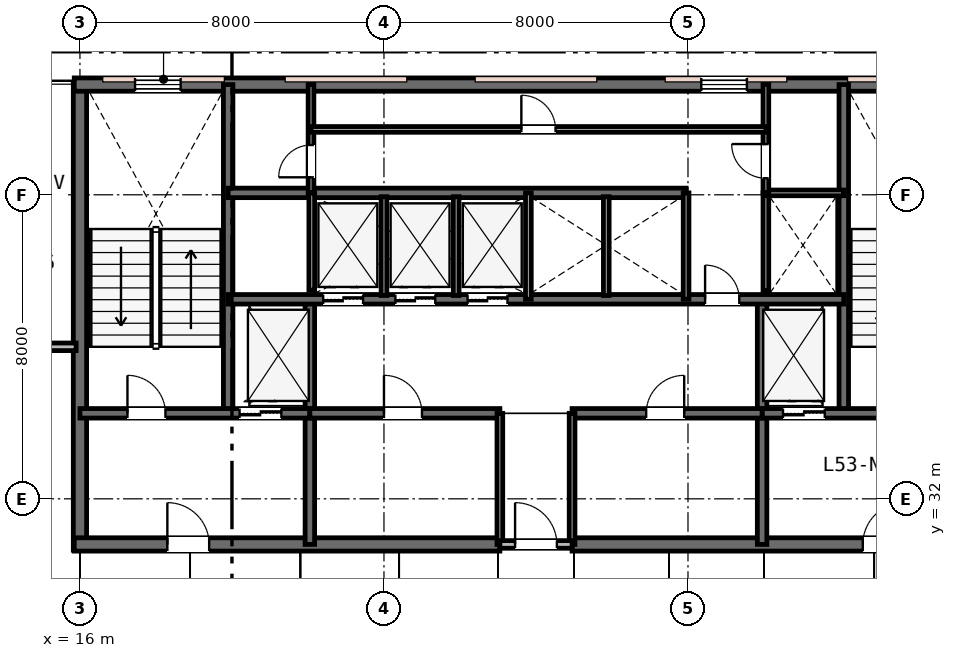
"""IFC4 building model, lengths in metres.
Left out: names, types, materials, properties, quantities, classifications, styles, units other than length and angle.
Written with IfcOpenShell. Run it as: python <this file> out.ifc"""

import sys

from ifc_helpers import new_model, si_unit, direction, frame, frame_2d, origin, place, context, subcontext, project, spatial, rectangle, extrude, element, fill, save


model = new_model("IFC4")
c1 = context("Model", 3, precision=1e-05, world=origin(), true_north=direction((0.0, 1.0)))
c2 = subcontext(c1, "Body", "Model", "MODEL_VIEW")
j1 = project(units=[si_unit("LENGTHUNIT", "METRE"), si_unit("PLANEANGLEUNIT", "RADIAN")], contexts=[c1])
p1 = place(None, origin())
s1 = spatial("IfcSite", under=j1, at=p1, CompositionType="ELEMENT")
p2 = place(p1, origin())
s2 = spatial("IfcBuilding", under=s1, at=p2, CompositionType="ELEMENT")
p3 = place(p2, frame((0.0, 0.0, 204.6)))
s3 = spatial("IfcBuildingStorey", under=s2, at=p3, CompositionType="ELEMENT", Elevation=204.6)
p4 = place(p3, frame((16.0, 30.65, 0.0), z_axis=(0.0, 0.0, 1.0), x_axis=(0.0, 1.0, 0.0)))
e1 = element("IfcWall", 1, at=p4, inside=s3, PredefinedType="SHEAR", context=c2, shape_type="SweptSolid", body=[
    extrude(rectangle(XDim=12.3, YDim=0.35, at=frame_2d((6.15, 0.0))), origin(), (0.0, 0.0, 1.0), 3.6),
])
p5 = place(p3, frame((15.85, 42.9, 0.0), z_axis=(0.0, 0.0, 1.0), x_axis=(1.0, 0.0, 0.0)))
e2 = element("IfcWall", 2, at=p5, inside=s3, PredefinedType="SHEAR", context=c2, shape_type="SweptSolid", body=[
    extrude(rectangle(XDim=24.3, YDim=0.35, at=frame_2d((12.15, 0.0))), origin(), (0.0, 0.0, 1.0), 3.6),
])
p6 = place(p5, frame((1.6, 0.0, 0.95)))
e3 = element("IfcOpeningElement", 3, at=p6, cuts=e2, PredefinedType="OPENING", context=c2, shape_type="SweptSolid", body=[
    extrude(rectangle(XDim=1.2, YDim=1.6, at=frame_2d((0.6, 0.8))), frame((0.0, 0.185, 0.0), z_axis=(0.0, -1.0, 0.0), x_axis=(1.0, 0.0, 0.0)), (0.0, 0.0, 1.0), 0.37),
])
p7 = place(p5, frame((16.5, 0.0, 0.95)))
e4 = element("IfcOpeningElement", 4, at=p7, cuts=e2, PredefinedType="OPENING", context=c2, shape_type="SweptSolid", body=[
    extrude(rectangle(XDim=1.2, YDim=1.6, at=frame_2d((0.6, 0.8))), frame((0.0, 0.185, 0.0), z_axis=(0.0, -1.0, 0.0), x_axis=(1.0, 0.0, 0.0)), (0.0, 0.0, 1.0), 0.37),
])
p8 = place(p5, frame((21.6, 0.0, 0.95)))
e5 = element("IfcOpeningElement", 5, at=p8, cuts=e2, PredefinedType="OPENING", context=c2, shape_type="SweptSolid", body=[
    extrude(rectangle(XDim=1.2, YDim=1.6, at=frame_2d((0.6, 0.8))), frame((0.0, 0.185, 0.0), z_axis=(0.0, -1.0, 0.0), x_axis=(1.0, 0.0, 0.0)), (0.0, 0.0, 1.0), 0.37),
])
p9 = place(p3, frame((15.85, 30.8, 0.0), z_axis=(0.0, 0.0, 1.0), x_axis=(1.0, 0.0, 0.0)))
e6 = element("IfcWall", 6, at=p9, inside=s3, PredefinedType="SHEAR", context=c2, shape_type="SweptSolid", body=[
    extrude(rectangle(XDim=11.2, YDim=0.35, at=frame_2d((5.6, 0.0))), origin(), (0.0, 0.0, 1.0), 3.6),
])
p10 = place(p9, frame((2.45, 0.0, 0.0)))
e7 = element("IfcOpeningElement", 7, at=p10, cuts=e6, PredefinedType="OPENING", context=c2, shape_type="SweptSolid", body=[
    extrude(rectangle(XDim=1.1, YDim=2.15, at=frame_2d((0.55, 1.075))), frame((0.0, 0.185, 0.0), z_axis=(0.0, -1.0, 0.0), x_axis=(1.0, 0.0, 0.0)), (0.0, 0.0, 1.0), 0.37),
])
p11 = place(p3, frame((28.95, 30.8, 0.0), z_axis=(0.0, 0.0, 1.0), x_axis=(1.0, 0.0, 0.0)))
e8 = element("IfcWall", 8, at=p11, inside=s3, PredefinedType="SHEAR", context=c2, shape_type="SweptSolid", body=[
    extrude(rectangle(XDim=11.2, YDim=0.35, at=frame_2d((5.6, 0.0))), origin(), (0.0, 0.0, 1.0), 3.6),
])
p12 = place(p11, frame((7.65, 0.0, 0.0)))
e9 = element("IfcOpeningElement", 9, at=p12, cuts=e8, PredefinedType="OPENING", context=c2, shape_type="SweptSolid", body=[
    extrude(rectangle(XDim=1.1, YDim=2.15, at=frame_2d((0.55, 1.075))), frame((0.0, 0.185, 0.0), z_axis=(0.0, -1.0, 0.0), x_axis=(1.0, 0.0, 0.0)), (0.0, 0.0, 1.0), 0.37),
])
for number, where, z_axis, x_axis in (
    (10, (19.9, 34.25, 0.0), (0.0, 0.0, 1.0), (0.0, 1.0, 0.0)),
    (11, (36.1, 34.25, 0.0), (0.0, 0.0, 1.0), (0.0, 1.0, 0.0)),
):
    element("IfcWall", number, at=place(p3, frame(where, z_axis=z_axis, x_axis=x_axis)), inside=s3, PredefinedType="SHEAR", context=c2, shape_type="SweptSolid", body=[
        extrude(rectangle(XDim=8.65, YDim=0.25, at=frame_2d((4.325, 0.0))), origin(), (0.0, 0.0, 1.0), 3.6),
    ])
for number, where, z_axis, x_axis in (
    (12, (22.05, 30.8, 0.0), (0.0, 0.0, 1.0), (0.0, 1.0, 0.0)),
    (13, (33.95, 30.8, 0.0), (0.0, 0.0, 1.0), (0.0, 1.0, 0.0)),
):
    element("IfcWall", number, at=place(p3, frame(where, z_axis=z_axis, x_axis=x_axis)), inside=s3, PredefinedType="SHEAR", context=c2, shape_type="SweptSolid", body=[
        extrude(rectangle(XDim=6.45, YDim=0.25, at=frame_2d((3.225, 0.0))), origin(), (0.0, 0.0, 1.0), 3.6),
    ])
p13 = place(p3, frame((16.0, 34.25, 0.0), z_axis=(0.0, 0.0, 1.0), x_axis=(1.0, 0.0, 0.0)))
e14 = element("IfcWall", 14, at=p13, inside=s3, PredefinedType="SHEAR", context=c2, shape_type="SweptSolid", body=[
    extrude(rectangle(XDim=6.05, YDim=0.25, at=frame_2d((3.025, 0.0))), origin(), (0.0, 0.0, 1.0), 3.6),
])
p14 = place(p13, frame((1.25, 0.0, 0.0)))
e15 = element("IfcOpeningElement", 15, at=p14, cuts=e14, PredefinedType="OPENING", context=c2, shape_type="SweptSolid", body=[
    extrude(rectangle(XDim=1.0, YDim=2.15, at=frame_2d((0.5, 1.075))), frame((0.0, 0.135, 0.0), z_axis=(0.0, -1.0, 0.0), x_axis=(1.0, 0.0, 0.0)), (0.0, 0.0, 1.0), 0.27),
])
p15 = place(p13, frame((4.2, 0.0, 0.0)))
e16 = element("IfcOpeningElement", 16, at=p15, cuts=e14, PredefinedType="OPENING", context=c2, shape_type="SweptSolid", body=[
    extrude(rectangle(XDim=1.1, YDim=2.15, at=frame_2d((0.55, 1.075))), frame((0.0, 0.135, 0.0), z_axis=(0.0, -1.0, 0.0), x_axis=(1.0, 0.0, 0.0)), (0.0, 0.0, 1.0), 0.27),
])
p16 = place(p3, frame((33.95, 34.25, 0.0), z_axis=(0.0, 0.0, 1.0), x_axis=(1.0, 0.0, 0.0)))
e17 = element("IfcWall", 17, at=p16, inside=s3, PredefinedType="SHEAR", context=c2, shape_type="SweptSolid", body=[
    extrude(rectangle(XDim=6.05, YDim=0.25, at=frame_2d((3.025, 0.0))), origin(), (0.0, 0.0, 1.0), 3.6),
])
p17 = place(p16, frame((3.7, 0.0, 0.0)))
e18 = element("IfcOpeningElement", 18, at=p17, cuts=e17, PredefinedType="OPENING", context=c2, shape_type="SweptSolid", body=[
    extrude(rectangle(XDim=1.0, YDim=2.15, at=frame_2d((0.5, 1.075))), frame((0.0, 0.135, 0.0), z_axis=(0.0, -1.0, 0.0), x_axis=(1.0, 0.0, 0.0)), (0.0, 0.0, 1.0), 0.27),
])
p18 = place(p16, frame((0.55, 0.0, 0.0)))
e19 = element("IfcOpeningElement", 19, at=p18, cuts=e17, PredefinedType="OPENING", context=c2, shape_type="SweptSolid", body=[
    extrude(rectangle(XDim=1.1, YDim=2.15, at=frame_2d((0.55, 1.075))), frame((0.0, 0.135, 0.0), z_axis=(0.0, -1.0, 0.0), x_axis=(1.0, 0.0, 0.0)), (0.0, 0.0, 1.0), 0.27),
])
p19 = place(p3, frame((22.05, 34.25, 0.0), z_axis=(0.0, 0.0, 1.0), x_axis=(1.0, 0.0, 0.0)))
e20 = element("IfcWall", 20, at=p19, inside=s3, PredefinedType="SHEAR", context=c2, shape_type="SweptSolid", body=[
    extrude(rectangle(XDim=5.0, YDim=0.25, at=frame_2d((2.5, 0.0))), origin(), (0.0, 0.0, 1.0), 3.6),
])
p20 = place(p19, frame((1.95, 0.0, 0.0)))
e21 = element("IfcOpeningElement", 21, at=p20, cuts=e20, PredefinedType="OPENING", context=c2, shape_type="SweptSolid", body=[
    extrude(rectangle(XDim=1.0, YDim=2.15, at=frame_2d((0.5, 1.075))), frame((0.0, 0.135, 0.0), z_axis=(0.0, -1.0, 0.0), x_axis=(1.0, 0.0, 0.0)), (0.0, 0.0, 1.0), 0.27),
])
p21 = place(p3, frame((28.95, 34.25, 0.0), z_axis=(0.0, 0.0, 1.0), x_axis=(1.0, 0.0, 0.0)))
e22 = element("IfcWall", 22, at=p21, inside=s3, PredefinedType="SHEAR", context=c2, shape_type="SweptSolid", body=[
    extrude(rectangle(XDim=5.0, YDim=0.25, at=frame_2d((2.5, 0.0))), origin(), (0.0, 0.0, 1.0), 3.6),
])
p22 = place(p21, frame((1.95, 0.0, 0.0)))
e23 = element("IfcOpeningElement", 23, at=p22, cuts=e22, PredefinedType="OPENING", context=c2, shape_type="SweptSolid", body=[
    extrude(rectangle(XDim=1.0, YDim=2.15, at=frame_2d((0.5, 1.075))), frame((0.0, 0.135, 0.0), z_axis=(0.0, -1.0, 0.0), x_axis=(1.0, 0.0, 0.0)), (0.0, 0.0, 1.0), 0.27),
])
p23 = place(p3, frame((19.9, 37.25, 0.0), z_axis=(0.0, 0.0, 1.0), x_axis=(1.0, 0.0, 0.0)))
e24 = element("IfcWall", 24, at=p23, inside=s3, PredefinedType="SHEAR", context=c2, shape_type="SweptSolid", body=[
    extrude(rectangle(XDim=16.2, YDim=0.25, at=frame_2d((8.1, 0.0))), origin(), (0.0, 0.0, 1.0), 3.6),
])
p24 = place(p23, frame((12.55, 0.0, 0.0)))
e25 = element("IfcOpeningElement", 25, at=p24, cuts=e24, PredefinedType="OPENING", context=c2, shape_type="SweptSolid", body=[
    extrude(rectangle(XDim=0.9, YDim=2.15, at=frame_2d((0.45, 1.075))), frame((0.0, 0.135, 0.0), z_axis=(0.0, -1.0, 0.0), x_axis=(1.0, 0.0, 0.0)), (0.0, 0.0, 1.0), 0.27),
])
p25 = place(p23, frame((2.5, 0.0, 0.0)))
e26 = element("IfcOpeningElement", 26, at=p25, cuts=e24, PredefinedType="OPENING", context=c2, shape_type="SweptSolid", body=[
    extrude(rectangle(XDim=1.05, YDim=2.15, at=frame_2d((0.525, 1.075))), frame((0.0, 0.135, 0.0), z_axis=(0.0, -1.0, 0.0), x_axis=(1.0, 0.0, 0.0)), (0.0, 0.0, 1.0), 0.27),
])
p26 = place(p23, frame((4.4, 0.0, 0.0)))
e27 = element("IfcOpeningElement", 27, at=p26, cuts=e24, PredefinedType="OPENING", context=c2, shape_type="SweptSolid", body=[
    extrude(rectangle(XDim=1.05, YDim=2.15, at=frame_2d((0.525, 1.075))), frame((0.0, 0.135, 0.0), z_axis=(0.0, -1.0, 0.0), x_axis=(1.0, 0.0, 0.0)), (0.0, 0.0, 1.0), 0.27),
])
p27 = place(p23, frame((6.3, 0.0, 0.0)))
e28 = element("IfcOpeningElement", 28, at=p27, cuts=e24, PredefinedType="OPENING", context=c2, shape_type="SweptSolid", body=[
    extrude(rectangle(XDim=1.05, YDim=2.15, at=frame_2d((0.525, 1.075))), frame((0.0, 0.135, 0.0), z_axis=(0.0, -1.0, 0.0), x_axis=(1.0, 0.0, 0.0)), (0.0, 0.0, 1.0), 0.27),
])
p28 = place(p3, frame((19.9, 40.05, 0.0), z_axis=(0.0, 0.0, 1.0), x_axis=(1.0, 0.0, 0.0)))
e29 = element("IfcWall", 29, at=p28, inside=s3, PredefinedType="SHEAR", context=c2, shape_type="SweptSolid", body=[
    extrude(rectangle(XDim=12.05, YDim=0.25, at=frame_2d((6.025, 0.0))), origin(), (0.0, 0.0, 1.0), 3.6),
])
for number, where, z_axis, x_axis in (
    (30, (27.05, 30.8, 0.0), (0.0, 0.0, 1.0), (0.0, 1.0, 0.0)),
    (31, (28.95, 30.8, 0.0), (0.0, 0.0, 1.0), (0.0, 1.0, 0.0)),
):
    element("IfcWall", number, at=place(p3, frame(where, z_axis=z_axis, x_axis=x_axis)), inside=s3, PredefinedType="PLUMBINGWALL", context=c2, shape_type="SweptSolid", body=[
        extrude(rectangle(XDim=3.45, YDim=0.15, at=frame_2d((1.725, 0.0))), origin(), (0.0, 0.0, 1.0), 2.93),
    ])
p29 = place(p3, frame((27.05, 30.8, 0.0), z_axis=(0.0, 0.0, 1.0), x_axis=(1.0, 0.0, 0.0)))
e32 = element("IfcWall", 32, at=p29, inside=s3, PredefinedType="PARTITIONING", context=c2, shape_type="SweptSolid", body=[
    extrude(rectangle(XDim=1.9, YDim=0.2, at=frame_2d((0.95, 0.0))), origin(), (0.0, 0.0, 1.0), 2.93),
])
p30 = place(p29, frame((0.4, 0.0, 0.0)))
e33 = element("IfcOpeningElement", 33, at=p30, cuts=e32, PredefinedType="OPENING", context=c2, shape_type="SweptSolid", body=[
    extrude(rectangle(XDim=1.1, YDim=2.15, at=frame_2d((0.55, 1.075))), frame((0.0, 0.11, 0.0), z_axis=(0.0, -1.0, 0.0), x_axis=(1.0, 0.0, 0.0)), (0.0, 0.0, 1.0), 0.22),
])
p31 = place(p3, frame((22.1, 37.49, 0.0), z_axis=(0.0, 0.0, 1.0), x_axis=(0.0, 1.0, 0.0)))
e34 = element("IfcWall", 34, at=p31, inside=s3, PredefinedType="PLUMBINGWALL", context=c2, shape_type="SweptSolid", body=[
    extrude(rectangle(XDim=2.56, YDim=0.15, at=frame_2d((1.28, 0.0))), origin(), (0.0, 0.0, 1.0), 3.24),
])
p32 = place(p3, frame((27.8, 37.25, 0.0), z_axis=(0.0, 0.0, 1.0), x_axis=(0.0, 1.0, 0.0)))
e35 = element("IfcWall", 35, at=p32, inside=s3, PredefinedType="PLUMBINGWALL", context=c2, shape_type="SweptSolid", body=[
    extrude(rectangle(XDim=2.8, YDim=0.15, at=frame_2d((1.4, 0.0))), origin(), (0.0, 0.0, 1.0), 3.24),
])
for number, where, z_axis, x_axis in (
    (36, (24.0, 37.35, 0.0), (0.0, 0.0, 1.0), (0.0, 1.0, 0.0)),
    (37, (25.9, 37.35, 0.0), (0.0, 0.0, 1.0), (0.0, 1.0, 0.0)),
):
    element("IfcWall", number, at=place(p3, frame(where, z_axis=z_axis, x_axis=x_axis)), inside=s3, PredefinedType="PLUMBINGWALL", context=c2, shape_type="SweptSolid", body=[
        extrude(rectangle(XDim=2.6, YDim=0.15, at=frame_2d((1.3, 0.0))), origin(), (0.0, 0.0, 1.0), 3.24),
    ])
p33 = place(p3, frame((31.95, 37.25, 0.0), z_axis=(0.0, 0.0, 1.0), x_axis=(0.0, 1.0, 0.0)))
e38 = element("IfcWall", 38, at=p33, inside=s3, PredefinedType="PLUMBINGWALL", context=c2, shape_type="SweptSolid", body=[
    extrude(rectangle(XDim=2.8, YDim=0.15, at=frame_2d((1.4, 0.0))), origin(), (0.0, 0.0, 1.0), 3.24),
])
p34 = place(p3, frame((29.85, 37.35, 0.0), z_axis=(0.0, 0.0, 1.0), x_axis=(0.0, 1.0, 0.0)))
e39 = element("IfcWall", 39, at=p34, inside=s3, PredefinedType="PLUMBINGWALL", context=c2, shape_type="SweptSolid", body=[
    extrude(rectangle(XDim=2.6, YDim=0.15, at=frame_2d((1.3, 0.0))), origin(), (0.0, 0.0, 1.0), 3.24),
])
p35 = place(p3, frame((34.05, 37.473, 0.0), z_axis=(0.0, 0.0, 1.0), x_axis=(0.0, 1.0, 0.0)))
e40 = element("IfcWall", 40, at=p35, inside=s3, PredefinedType="PLUMBINGWALL", context=c2, shape_type="SweptSolid", body=[
    extrude(rectangle(XDim=2.577, YDim=0.15, at=frame_2d((1.288, 0.0))), origin(), (0.0, 0.0, 1.0), 3.24),
])
p36 = place(p3, frame((34.05, 40.05, 0.0), z_axis=(0.0, 0.0, 1.0), x_axis=(1.0, 0.0, 0.0)))
e41 = element("IfcWall", 41, at=p36, inside=s3, PredefinedType="PARTITIONING", context=c2, shape_type="SweptSolid", body=[
    extrude(rectangle(XDim=2.05, YDim=0.15, at=frame_2d((1.025, 0.0))), origin(), (0.0, 0.0, 1.0), 3.24),
])
p37 = place(p3, frame((34.05, 40.05, 0.0), z_axis=(0.0, 0.0, 1.0), x_axis=(0.0, 1.0, 0.0)))
e42 = element("IfcWall", 42, at=p37, inside=s3, PredefinedType="PARTITIONING", context=c2, shape_type="SweptSolid", body=[
    extrude(rectangle(XDim=2.85, YDim=0.15, at=frame_2d((1.425, 0.0))), origin(), (0.0, 0.0, 1.0), 3.24),
])
p38 = place(p37, frame((0.385, 0.0, 0.0)))
e43 = element("IfcOpeningElement", 43, at=p38, cuts=e42, PredefinedType="OPENING", context=c2, shape_type="SweptSolid", body=[
    extrude(rectangle(XDim=0.9, YDim=2.15, at=frame_2d((0.45, 1.075))), frame((0.0, 0.085, 0.0), z_axis=(0.0, -1.0, 0.0), x_axis=(1.0, 0.0, 0.0)), (0.0, 0.0, 1.0), 0.17),
])
p39 = place(p3, frame((22.08, 40.05, 0.0), z_axis=(0.0, 0.0, 1.0), x_axis=(0.0, 1.0, 0.0)))
e44 = element("IfcWall", 44, at=p39, inside=s3, PredefinedType="PARTITIONING", context=c2, shape_type="SweptSolid", body=[
    extrude(rectangle(XDim=2.85, YDim=0.15, at=frame_2d((1.425, 0.0))), origin(), (0.0, 0.0, 1.0), 3.24),
])
p40 = place(p39, frame((0.41, 0.0, 0.0)))
e45 = element("IfcOpeningElement", 45, at=p40, cuts=e44, PredefinedType="OPENING", context=c2, shape_type="SweptSolid", body=[
    extrude(rectangle(XDim=0.85, YDim=2.15, at=frame_2d((0.425, 1.075))), frame((0.0, 0.085, 0.0), z_axis=(0.0, -1.0, 0.0), x_axis=(1.0, 0.0, 0.0)), (0.0, 0.0, 1.0), 0.17),
])
p41 = place(p3, frame((22.08, 41.72, 0.0), z_axis=(0.0, 0.0, 1.0), x_axis=(1.0, 0.0, 0.0)))
e46 = element("IfcWall", 46, at=p41, inside=s3, PredefinedType="PARTITIONING", context=c2, shape_type="SweptSolid", body=[
    extrude(rectangle(XDim=11.97, YDim=0.15, at=frame_2d((5.985, 0.0))), origin(), (0.0, 0.0, 1.0), 3.24),
])
p42 = place(p41, frame((5.535, 0.0, 0.0)))
e47 = element("IfcOpeningElement", 47, at=p42, cuts=e46, PredefinedType="OPENING", context=c2, shape_type="SweptSolid", body=[
    extrude(rectangle(XDim=0.9, YDim=2.15, at=frame_2d((0.45, 1.075))), frame((0.0, 0.085, 0.0), z_axis=(0.0, -1.0, 0.0), x_axis=(1.0, 0.0, 0.0)), (0.0, 0.0, 1.0), 0.17),
])
p43 = place(p3, frame((5.1, 36.0, 0.0), z_axis=(0.0, 0.0, 1.0), x_axis=(1.0, 0.0, 0.0)))
e48 = element("IfcWall", 48, at=p43, inside=s3, PredefinedType="PARTITIONING", context=c2, shape_type="SweptSolid", body=[
    extrude(rectangle(XDim=10.8, YDim=0.2, at=frame_2d((5.4, 0.0))), origin(), (0.0, 0.0, 1.0), 2.95),
])
p44 = place(p43, frame((6.975, 0.0, 0.0)))
e49 = element("IfcOpeningElement", 49, at=p44, cuts=e48, PredefinedType="OPENING", context=c2, shape_type="SweptSolid", body=[
    extrude(rectangle(XDim=0.95, YDim=2.15, at=frame_2d((0.475, 1.075))), frame((0.0, 0.11, 0.0), z_axis=(0.0, -1.0, 0.0), x_axis=(1.0, 0.0, 0.0)), (0.0, 0.0, 1.0), 0.22),
])
p45 = place(p6, origin())
e50 = element("IfcWindow", 50, at=p45, inside=s3, PartitioningType="SINGLE_PANEL", PredefinedType="WINDOW", context=c2, shape_type="SweptSolid", body=[
    extrude(rectangle(XDim=1.2, YDim=1.6, at=frame_2d((0.6, 0.8))), frame((0.0, 0.03, 0.0), z_axis=(0.0, -1.0, 0.0), x_axis=(1.0, 0.0, 0.0)), (0.0, 0.0, 1.0), 0.06),
])
fill(e3, e50)
p46 = place(p7, origin())
e51 = element("IfcWindow", 51, at=p46, inside=s3, PartitioningType="SINGLE_PANEL", PredefinedType="WINDOW", context=c2, shape_type="SweptSolid", body=[
    extrude(rectangle(XDim=1.2, YDim=1.6, at=frame_2d((0.6, 0.8))), frame((0.0, 0.03, 0.0), z_axis=(0.0, -1.0, 0.0), x_axis=(1.0, 0.0, 0.0)), (0.0, 0.0, 1.0), 0.06),
])
fill(e4, e51)
p47 = place(p30, origin())
e52 = element("IfcDoor", 52, at=p47, inside=s3, OperationType="SINGLE_SWING_LEFT", PredefinedType="DOOR", context=c2, shape_type="SweptSolid", body=[
    extrude(rectangle(XDim=1.1, YDim=2.15, at=frame_2d((0.55, 1.075))), frame((0.0, 0.025, 0.0), z_axis=(0.0, -1.0, 0.0), x_axis=(1.0, 0.0, 0.0)), (0.0, 0.0, 1.0), 0.05),
])
fill(e33, e52)
p48 = place(p14, origin())
e53 = element("IfcDoor", 53, at=p48, inside=s3, OperationType="SINGLE_SWING_LEFT", PredefinedType="DOOR", context=c2, shape_type="SweptSolid", body=[
    extrude(rectangle(XDim=1.0, YDim=2.15, at=frame_2d((0.5, 1.075))), frame((0.0, 0.025, 0.0), z_axis=(0.0, -1.0, 0.0), x_axis=(1.0, 0.0, 0.0)), (0.0, 0.0, 1.0), 0.05),
])
fill(e15, e53)
p49 = place(p10, origin())
e54 = element("IfcDoor", 54, at=p49, inside=s3, OperationType="SINGLE_SWING_LEFT", PredefinedType="DOOR", context=c2, shape_type="SweptSolid", body=[
    extrude(rectangle(XDim=1.1, YDim=2.15, at=frame_2d((0.55, 1.075))), frame((0.0, 0.025, 0.0), z_axis=(0.0, -1.0, 0.0), x_axis=(1.0, 0.0, 0.0)), (0.0, 0.0, 1.0), 0.05),
])
fill(e7, e54)
p50 = place(p12, origin())
e55 = element("IfcDoor", 55, at=p50, inside=s3, OperationType="SINGLE_SWING_RIGHT", PredefinedType="DOOR", context=c2, shape_type="SweptSolid", body=[
    extrude(rectangle(XDim=1.1, YDim=2.15, at=frame_2d((0.55, 1.075))), frame((0.0, 0.025, 0.0), z_axis=(0.0, -1.0, 0.0), x_axis=(1.0, 0.0, 0.0)), (0.0, 0.0, 1.0), 0.05),
])
fill(e9, e55)
p51 = place(p20, origin())
e56 = element("IfcDoor", 56, at=p51, inside=s3, OperationType="SINGLE_SWING_LEFT", PredefinedType="DOOR", context=c2, shape_type="SweptSolid", body=[
    extrude(rectangle(XDim=1.0, YDim=2.15, at=frame_2d((0.5, 1.075))), frame((0.0, 0.025, 0.0), z_axis=(0.0, -1.0, 0.0), x_axis=(1.0, 0.0, 0.0)), (0.0, 0.0, 1.0), 0.05),
])
fill(e21, e56)
p52 = place(p22, origin())
e57 = element("IfcDoor", 57, at=p52, inside=s3, OperationType="SINGLE_SWING_RIGHT", PredefinedType="DOOR", context=c2, shape_type="SweptSolid", body=[
    extrude(rectangle(XDim=1.0, YDim=2.15, at=frame_2d((0.5, 1.075))), frame((0.0, 0.025, 0.0), z_axis=(0.0, -1.0, 0.0), x_axis=(1.0, 0.0, 0.0)), (0.0, 0.0, 1.0), 0.05),
])
fill(e23, e57)
p53 = place(p24, origin())
e58 = element("IfcDoor", 58, at=p53, inside=s3, OperationType="SINGLE_SWING_LEFT", PredefinedType="DOOR", context=c2, shape_type="SweptSolid", body=[
    extrude(rectangle(XDim=0.9, YDim=2.15, at=frame_2d((0.45, 1.075))), frame((0.0, 0.025, 0.0), z_axis=(0.0, -1.0, 0.0), x_axis=(1.0, 0.0, 0.0)), (0.0, 0.0, 1.0), 0.05),
])
fill(e25, e58)
p54 = place(p38, origin())
e59 = element("IfcDoor", 59, at=p54, inside=s3, OperationType="SINGLE_SWING_RIGHT", PredefinedType="DOOR", context=c2, shape_type="SweptSolid", body=[
    extrude(rectangle(XDim=0.9, YDim=2.15, at=frame_2d((0.45, 1.075))), frame((0.0, 0.025, 0.0), z_axis=(0.0, -1.0, 0.0), x_axis=(1.0, 0.0, 0.0)), (0.0, 0.0, 1.0), 0.05),
])
fill(e43, e59)
p55 = place(p40, origin())
e60 = element("IfcDoor", 60, at=p55, inside=s3, OperationType="SINGLE_SWING_LEFT", PredefinedType="DOOR", context=c2, shape_type="SweptSolid", body=[
    extrude(rectangle(XDim=0.85, YDim=2.15, at=frame_2d((0.425, 1.075))), frame((0.0, 0.025, 0.0), z_axis=(0.0, -1.0, 0.0), x_axis=(1.0, 0.0, 0.0)), (0.0, 0.0, 1.0), 0.05),
])
fill(e45, e60)
p56 = place(p42, origin())
e61 = element("IfcDoor", 61, at=p56, inside=s3, OperationType="SINGLE_SWING_LEFT", PredefinedType="DOOR", context=c2, shape_type="SweptSolid", body=[
    extrude(rectangle(XDim=0.9, YDim=2.15, at=frame_2d((0.45, 1.075))), frame((0.0, 0.025, 0.0), z_axis=(0.0, -1.0, 0.0), x_axis=(1.0, 0.0, 0.0)), (0.0, 0.0, 1.0), 0.05),
])
fill(e47, e61)
p57 = place(p15, origin())
e62 = element("IfcDoor", 62, at=p57, inside=s3, OperationType="DOUBLE_DOOR_SLIDING", PredefinedType="DOOR", context=c2, shape_type="SweptSolid", body=[
    extrude(rectangle(XDim=1.1, YDim=2.15, at=frame_2d((0.55, 1.075))), frame((0.0, 0.025, 0.0), z_axis=(0.0, -1.0, 0.0), x_axis=(1.0, 0.0, 0.0)), (0.0, 0.0, 1.0), 0.05),
])
fill(e16, e62)
p58 = place(p18, origin())
e63 = element("IfcDoor", 63, at=p58, inside=s3, OperationType="DOUBLE_DOOR_SLIDING", PredefinedType="DOOR", context=c2, shape_type="SweptSolid", body=[
    extrude(rectangle(XDim=1.1, YDim=2.15, at=frame_2d((0.55, 1.075))), frame((0.0, 0.025, 0.0), z_axis=(0.0, -1.0, 0.0), x_axis=(1.0, 0.0, 0.0)), (0.0, 0.0, 1.0), 0.05),
])
fill(e19, e63)
p59 = place(p25, origin())
e64 = element("IfcDoor", 64, at=p59, inside=s3, OperationType="DOUBLE_DOOR_SLIDING", PredefinedType="DOOR", context=c2, shape_type="SweptSolid", body=[
    extrude(rectangle(XDim=1.05, YDim=2.15, at=frame_2d((0.525, 1.075))), frame((0.0, 0.025, 0.0), z_axis=(0.0, -1.0, 0.0), x_axis=(1.0, 0.0, 0.0)), (0.0, 0.0, 1.0), 0.05),
])
fill(e26, e64)
p60 = place(p26, origin())
e65 = element("IfcDoor", 65, at=p60, inside=s3, OperationType="DOUBLE_DOOR_SLIDING", PredefinedType="DOOR", context=c2, shape_type="SweptSolid", body=[
    extrude(rectangle(XDim=1.05, YDim=2.15, at=frame_2d((0.525, 1.075))), frame((0.0, 0.025, 0.0), z_axis=(0.0, -1.0, 0.0), x_axis=(1.0, 0.0, 0.0)), (0.0, 0.0, 1.0), 0.05),
])
fill(e27, e65)
p61 = place(p27, origin())
e66 = element("IfcDoor", 66, at=p61, inside=s3, OperationType="DOUBLE_DOOR_SLIDING", PredefinedType="DOOR", context=c2, shape_type="SweptSolid", body=[
    extrude(rectangle(XDim=1.05, YDim=2.15, at=frame_2d((0.525, 1.075))), frame((0.0, 0.025, 0.0), z_axis=(0.0, -1.0, 0.0), x_axis=(1.0, 0.0, 0.0)), (0.0, 0.0, 1.0), 0.05),
])
fill(e28, e66)
save(model, sys.argv[1])
